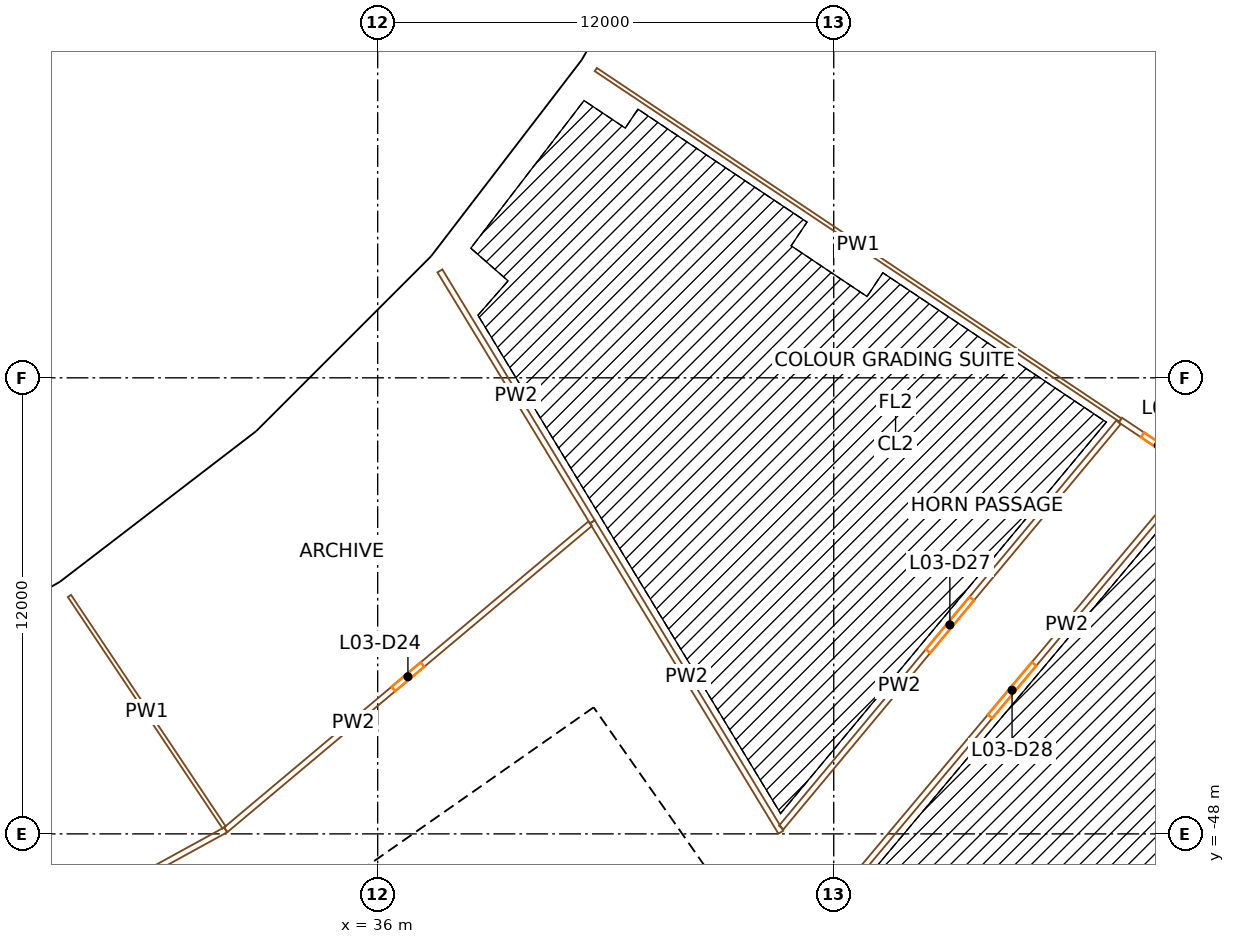
"""IFC4 building model, lengths in metres.
Left out: names, types, materials, properties, quantities, classifications, styles, units other than length and angle.
Written with IfcOpenShell. Run it as: python <this file> out.ifc"""

import sys

from ifc_helpers import new_model, si_unit, direction, frame, frame_2d, origin, origin_2d, place, context, subcontext, project, spatial, rectangle, extrude, element, fill, save


model = new_model("IFC4")
c1 = context("Model", 3, precision=1e-05, world=origin(), true_north=direction((0.0, 1.0)))
c2 = subcontext(c1, "Body", "Model", "MODEL_VIEW")
j1 = project(units=[si_unit("LENGTHUNIT", "METRE"), si_unit("PLANEANGLEUNIT", "RADIAN")], contexts=[c1])
p1 = place(None, origin())
s1 = spatial("IfcSite", under=j1, at=p1, CompositionType="ELEMENT")
p2 = place(p1, origin())
s2 = spatial("IfcBuilding", under=s1, at=p2, CompositionType="ELEMENT")
p3 = place(p2, frame((0.0, 0.0, 27.0)))
s3 = spatial("IfcBuildingStorey", under=s2, at=p3, CompositionType="ELEMENT", Elevation=27.0)
p4 = place(p3, frame((28.195, -42.197, 0.0), z_axis=(0.0, 0.0, 1.0), x_axis=(0.831469612303, 0.55557023302, 0.0)))
e1 = element("IfcColumn", 1, at=p4, inside=s3, PredefinedType="COLUMN", context=c2, shape_type="SweptSolid", body=[
    extrude(rectangle(XDim=1.1, YDim=1.3, at=origin_2d()), origin(), (0.0, 0.0, 1.0), 4.5),
])
p5 = place(p3, frame((32.362, -48.433, 0.0), z_axis=(0.0, 0.0, 1.0), x_axis=(0.831469612303, 0.55557023302, 0.0)))
e2 = element("IfcColumn", 2, at=p5, inside=s3, PredefinedType="COLUMN", context=c2, shape_type="SweptSolid", body=[
    extrude(rectangle(XDim=1.4, YDim=1.8, at=origin_2d()), origin(), (0.0, 0.0, 1.0), 4.5),
])
p6 = place(p3, frame((33.462, -38.156, 0.0), z_axis=(0.0, 0.0, 1.0), x_axis=(0.751839807479, 0.6593458151, 0.0)))
e3 = element("IfcColumn", 3, at=p6, inside=s3, PredefinedType="COLUMN", context=c2, shape_type="SweptSolid", body=[
    extrude(rectangle(XDim=1.1, YDim=1.3, at=origin_2d()), origin(), (0.0, 0.0, 1.0), 4.5),
])
p7 = place(p3, frame((38.407, -43.795, 0.0), z_axis=(0.0, 0.0, 1.0), x_axis=(0.751839807479, 0.6593458151, 0.0)))
e4 = element("IfcColumn", 4, at=p7, inside=s3, PredefinedType="COLUMN", context=c2, shape_type="SweptSolid", body=[
    extrude(rectangle(XDim=1.4, YDim=1.8, at=origin_2d()), origin(), (0.0, 0.0, 1.0), 4.5),
])
p8 = place(p3, frame((38.156, -33.462, 0.0), z_axis=(0.0, 0.0, 1.0), x_axis=(0.6593458151, 0.751839807479, 0.0)))
e5 = element("IfcColumn", 5, at=p8, inside=s3, PredefinedType="COLUMN", context=c2, shape_type="SweptSolid", body=[
    extrude(rectangle(XDim=1.1, YDim=1.3, at=origin_2d()), origin(), (0.0, 0.0, 1.0), 4.5),
])
p9 = place(p3, frame((43.795, -38.407, 0.0), z_axis=(0.0, 0.0, 1.0), x_axis=(0.6593458151, 0.751839807479, 0.0)))
e6 = element("IfcColumn", 6, at=p9, inside=s3, PredefinedType="COLUMN", context=c2, shape_type="SweptSolid", body=[
    extrude(rectangle(XDim=1.4, YDim=1.8, at=origin_2d()), origin(), (0.0, 0.0, 1.0), 4.5),
])
p10 = place(p3, frame((42.197, -28.195, 0.0), z_axis=(0.0, 0.0, 1.0), x_axis=(0.55557023302, 0.831469612303, 0.0)))
e7 = element("IfcColumn", 7, at=p10, inside=s3, PredefinedType="COLUMN", context=c2, shape_type="SweptSolid", body=[
    extrude(rectangle(XDim=1.1, YDim=1.3, at=origin_2d()), origin(), (0.0, 0.0, 1.0), 4.5),
])
p11 = place(p3, frame((48.433, -32.362, 0.0), z_axis=(0.0, 0.0, 1.0), x_axis=(0.55557023302, 0.831469612303, 0.0)))
e8 = element("IfcColumn", 8, at=p11, inside=s3, PredefinedType="COLUMN", context=c2, shape_type="SweptSolid", body=[
    extrude(rectangle(XDim=1.4, YDim=1.8, at=origin_2d()), origin(), (0.0, 0.0, 1.0), 4.5),
])
p12 = place(p3, frame((49.779, -57.191, 0.0), z_axis=(0.0, 0.0, 1.0), x_axis=(-0.573577477574, 0.819151315216, 0.0)))
e9 = element("IfcWall", 9, at=p12, inside=s3, PredefinedType="SHEAR", context=c2, shape_type="SweptSolid", body=[
    extrude(rectangle(XDim=14.8, YDim=0.9, at=frame_2d((7.4, 0.0))), origin(), (0.0, 0.0, 1.0), 4.1),
])
p13 = place(p12, frame((6.7, 0.0, 0.0)))
e10 = element("IfcOpeningElement", 10, at=p13, cuts=e9, PredefinedType="OPENING", context=c2, shape_type="SweptSolid", body=[
    extrude(rectangle(XDim=1.4, YDim=2.1, at=frame_2d((0.7, 1.05))), frame((0.0, 0.46, 0.0), z_axis=(0.0, -1.0, 0.0), x_axis=(1.0, 0.0, 0.0)), (0.0, 0.0, 1.0), 0.92),
])
p14 = place(p3, frame((28.854, -54.324, 0.0), z_axis=(0.0, 0.0, 1.0), x_axis=(0.819145767589, 0.573585400304, 0.0)))
e11 = element("IfcWall", 11, at=p14, inside=s3, PredefinedType="SHEAR", context=c2, shape_type="SweptSolid", body=[
    extrude(rectangle(XDim=15.045, YDim=0.9, at=frame_2d((7.523, 0.0))), origin(), (0.0, 0.0, 1.0), 4.1),
])
p15 = place(p14, frame((0.6, 0.0, 0.0)))
e12 = element("IfcOpeningElement", 12, at=p15, cuts=e11, PredefinedType="OPENING", context=c2, shape_type="SweptSolid", body=[
    extrude(rectangle(XDim=1.0, YDim=2.1, at=frame_2d((0.5, 1.05))), frame((0.0, 0.46, 0.0), z_axis=(0.0, -1.0, 0.0), x_axis=(1.0, 0.0, 0.0)), (0.0, 0.0, 1.0), 0.92),
])
p16 = place(p14, frame((3.275, 0.0, 0.0)))
e13 = element("IfcOpeningElement", 13, at=p16, cuts=e11, PredefinedType="OPENING", context=c2, shape_type="SweptSolid", body=[
    extrude(rectangle(XDim=1.0, YDim=2.1, at=frame_2d((0.5, 1.05))), frame((0.0, 0.46, 0.0), z_axis=(0.0, -1.0, 0.0), x_axis=(1.0, 0.0, 0.0)), (0.0, 0.0, 1.0), 0.92),
])
p17 = place(p14, frame((6.225, 0.0, 0.0)))
e14 = element("IfcOpeningElement", 14, at=p17, cuts=e11, PredefinedType="OPENING", context=c2, shape_type="SweptSolid", body=[
    extrude(rectangle(XDim=0.9, YDim=2.1, at=frame_2d((0.45, 1.05))), frame((0.0, 0.46, 0.0), z_axis=(0.0, -1.0, 0.0), x_axis=(1.0, 0.0, 0.0)), (0.0, 0.0, 1.0), 0.92),
])
p18 = place(p14, frame((13.495, 0.0, 0.0)))
e15 = element("IfcOpeningElement", 15, at=p18, cuts=e11, PredefinedType="OPENING", context=c2, shape_type="SweptSolid", body=[
    extrude(rectangle(XDim=1.1, YDim=2.1, at=frame_2d((0.55, 1.05))), frame((0.0, 0.46, 0.0), z_axis=(0.0, -1.0, 0.0), x_axis=(1.0, 0.0, 0.0)), (0.0, 0.0, 1.0), 0.92),
])
p19 = place(p3, frame((27.714, -41.583, 0.0), z_axis=(0.0, 0.0, 1.0), x_axis=(-0.866022817921, -0.50000447882, 0.0)))
e16 = element("IfcWall", 16, at=p19, inside=s3, PredefinedType="SOLIDWALL", context=c2, shape_type="SweptSolid", body=[
    extrude(rectangle(XDim=6.419, YDim=0.45, at=frame_2d((3.21, 0.0))), origin(), (0.0, 0.0, 1.0), 3.2),
])
p20 = place(p19, frame((3.66, 0.0, 0.9)))
e17 = element("IfcOpeningElement", 17, at=p20, cuts=e16, PredefinedType="OPENING", context=c2, shape_type="SweptSolid", body=[
    extrude(rectangle(XDim=1.2, YDim=2.15, at=frame_2d((0.6, 1.075))), frame((0.0, 0.235, 0.0), z_axis=(0.0, -1.0, 0.0), x_axis=(1.0, 0.0, 0.0)), (0.0, 0.0, 1.0), 0.47),
])
p21 = place(p19, frame((1.56, 0.0, 0.9)))
e18 = element("IfcOpeningElement", 18, at=p21, cuts=e16, PredefinedType="OPENING", context=c2, shape_type="SweptSolid", body=[
    extrude(rectangle(XDim=1.2, YDim=2.15, at=frame_2d((0.6, 1.075))), frame((0.0, 0.235, 0.0), z_axis=(0.0, -1.0, 0.0), x_axis=(1.0, 0.0, 0.0)), (0.0, 0.0, 1.0), 0.47),
])
p22 = place(p3, frame((32.975, -37.555, 0.0), z_axis=(0.0, 0.0, 1.0), x_axis=(-0.793338838284, -0.608780327927, 0.0)))
e19 = element("IfcWall", 19, at=p22, inside=s3, PredefinedType="SOLIDWALL", context=c2, shape_type="SweptSolid", body=[
    extrude(rectangle(XDim=6.597, YDim=0.45, at=frame_2d((3.298, 0.0))), origin(), (0.0, 0.0, 1.0), 3.2),
])
p23 = place(p22, frame((3.749, 0.0, 0.9)))
e20 = element("IfcOpeningElement", 20, at=p23, cuts=e19, PredefinedType="OPENING", context=c2, shape_type="SweptSolid", body=[
    extrude(rectangle(XDim=1.2, YDim=2.15, at=frame_2d((0.6, 1.075))), frame((0.0, 0.235, 0.0), z_axis=(0.0, -1.0, 0.0), x_axis=(1.0, 0.0, 0.0)), (0.0, 0.0, 1.0), 0.47),
])
p24 = place(p22, frame((1.648, 0.0, 0.9)))
e21 = element("IfcOpeningElement", 21, at=p24, cuts=e19, PredefinedType="OPENING", context=c2, shape_type="SweptSolid", body=[
    extrude(rectangle(XDim=1.2, YDim=2.15, at=frame_2d((0.6, 1.075))), frame((0.0, 0.235, 0.0), z_axis=(0.0, -1.0, 0.0), x_axis=(1.0, 0.0, 0.0)), (0.0, 0.0, 1.0), 0.47),
])
p25 = place(p3, frame((37.532, -32.993, 0.0), z_axis=(0.0, 0.0, 1.0), x_axis=(-0.707106781187, -0.707106781187, 0.0)))
e22 = element("IfcWall", 22, at=p25, inside=s3, PredefinedType="SOLIDWALL", context=c2, shape_type="SweptSolid", body=[
    extrude(rectangle(XDim=6.419, YDim=0.45, at=frame_2d((3.209, 0.0))), origin(), (0.0, 0.0, 1.0), 3.2),
])
p26 = place(p25, frame((3.66, 0.0, 0.9)))
e23 = element("IfcOpeningElement", 23, at=p26, cuts=e22, PredefinedType="OPENING", context=c2, shape_type="SweptSolid", body=[
    extrude(rectangle(XDim=1.2, YDim=2.15, at=frame_2d((0.6, 1.075))), frame((0.0, 0.235, 0.0), z_axis=(0.0, -1.0, 0.0), x_axis=(1.0, 0.0, 0.0)), (0.0, 0.0, 1.0), 0.47),
])
p27 = place(p25, frame((1.56, 0.0, 0.9)))
e24 = element("IfcOpeningElement", 24, at=p27, cuts=e22, PredefinedType="OPENING", context=c2, shape_type="SweptSolid", body=[
    extrude(rectangle(XDim=1.2, YDim=2.15, at=frame_2d((0.6, 1.075))), frame((0.0, 0.235, 0.0), z_axis=(0.0, -1.0, 0.0), x_axis=(1.0, 0.0, 0.0)), (0.0, 0.0, 1.0), 0.47),
])
p28 = place(p3, frame((41.571, -27.741, 0.0), z_axis=(0.0, 0.0, 1.0), x_axis=(-0.608780327927, -0.793338838284, 0.0)))
e25 = element("IfcWall", 25, at=p28, inside=s3, PredefinedType="SOLIDWALL", context=c2, shape_type="SweptSolid", body=[
    extrude(rectangle(XDim=6.597, YDim=0.45, at=frame_2d((3.298, 0.0))), origin(), (0.0, 0.0, 1.0), 3.2),
])
p29 = place(p28, frame((3.749, 0.0, 0.9)))
e26 = element("IfcOpeningElement", 26, at=p29, cuts=e25, PredefinedType="OPENING", context=c2, shape_type="SweptSolid", body=[
    extrude(rectangle(XDim=1.2, YDim=2.15, at=frame_2d((0.6, 1.075))), frame((0.0, 0.235, 0.0), z_axis=(0.0, -1.0, 0.0), x_axis=(1.0, 0.0, 0.0)), (0.0, 0.0, 1.0), 0.47),
])
p30 = place(p28, frame((1.648, 0.0, 0.9)))
e27 = element("IfcOpeningElement", 27, at=p30, cuts=e25, PredefinedType="OPENING", context=c2, shape_type="SweptSolid", body=[
    extrude(rectangle(XDim=1.2, YDim=2.15, at=frame_2d((0.6, 1.075))), frame((0.0, 0.235, 0.0), z_axis=(0.0, -1.0, 0.0), x_axis=(1.0, 0.0, 0.0)), (0.0, 0.0, 1.0), 0.47),
])
p31 = place(p3, frame((44.792, -22.155, 0.0), z_axis=(0.0, 0.0, 1.0), x_axis=(-0.50000447882, -0.866022817921, 0.0)))
e28 = element("IfcWall", 28, at=p31, inside=s3, PredefinedType="SOLIDWALL", context=c2, shape_type="SweptSolid", body=[
    extrude(rectangle(XDim=6.419, YDim=0.45, at=frame_2d((3.21, 0.0))), origin(), (0.0, 0.0, 1.0), 3.2),
])
p32 = place(p31, frame((3.66, 0.0, 0.9)))
e29 = element("IfcOpeningElement", 29, at=p32, cuts=e28, PredefinedType="OPENING", context=c2, shape_type="SweptSolid", body=[
    extrude(rectangle(XDim=1.2, YDim=2.15, at=frame_2d((0.6, 1.075))), frame((0.0, 0.235, 0.0), z_axis=(0.0, -1.0, 0.0), x_axis=(1.0, 0.0, 0.0)), (0.0, 0.0, 1.0), 0.47),
])
p33 = place(p31, frame((1.56, 0.0, 0.9)))
e30 = element("IfcOpeningElement", 30, at=p33, cuts=e28, PredefinedType="OPENING", context=c2, shape_type="SweptSolid", body=[
    extrude(rectangle(XDim=1.2, YDim=2.15, at=frame_2d((0.6, 1.075))), frame((0.0, 0.235, 0.0), z_axis=(0.0, -1.0, 0.0), x_axis=(1.0, 0.0, 0.0)), (0.0, 0.0, 1.0), 0.47),
])
p34 = place(p3, frame((23.24, -52.697, 0.0), z_axis=(0.0, 0.0, 1.0), x_axis=(0.876826033283, 0.480807765492, 0.0)))
e31 = element("IfcWall", 31, at=p34, inside=s3, PredefinedType="PARTITIONING", context=c2, shape_type="SweptSolid", body=[
    extrude(rectangle(XDim=9.991, YDim=0.15, at=frame_2d((4.996, 0.0))), origin(), (0.0, 0.0, 1.0), 3.1),
])
p35 = place(p34, frame((4.496, 0.0, 0.0)))
e32 = element("IfcOpeningElement", 32, at=p35, cuts=e31, PredefinedType="OPENING", context=c2, shape_type="SweptSolid", body=[
    extrude(rectangle(XDim=1.0, YDim=2.1, at=frame_2d((0.5, 1.05))), frame((0.0, 0.085, 0.0), z_axis=(0.0, -1.0, 0.0), x_axis=(1.0, 0.0, 0.0)), (0.0, 0.0, 1.0), 0.17),
])
p36 = place(p3, frame((27.89, -41.74, 0.0), z_axis=(0.0, 0.0, 1.0), x_axis=(0.555569023768, -0.831470420297, 0.0)))
e33 = element("IfcWall", 33, at=p36, inside=s3, PredefinedType="PARTITIONING", context=c2, shape_type="SweptSolid", body=[
    extrude(rectangle(XDim=7.325, YDim=0.1, at=frame_2d((3.663, 0.0))), origin(), (0.0, 0.0, 1.0), 3.1),
])
p37 = place(p3, frame((32.001, -47.893, 0.0), z_axis=(0.0, 0.0, 1.0), x_axis=(0.765734049768, 0.643157340801, 0.0)))
e34 = element("IfcWall", 34, at=p37, inside=s3, PredefinedType="PARTITIONING", context=c2, shape_type="SweptSolid", body=[
    extrude(rectangle(XDim=12.524, YDim=0.15, at=frame_2d((6.262, 0.0))), origin(), (0.0, 0.0, 1.0), 3.1),
])
p38 = place(p37, frame((5.762, 0.0, 0.0)))
e35 = element("IfcOpeningElement", 35, at=p38, cuts=e34, PredefinedType="OPENING", context=c2, shape_type="SweptSolid", body=[
    extrude(rectangle(XDim=1.0, YDim=2.1, at=frame_2d((0.5, 1.05))), frame((0.0, 0.085, 0.0), z_axis=(0.0, -1.0, 0.0), x_axis=(1.0, 0.0, 0.0)), (0.0, 0.0, 1.0), 0.17),
])
p39 = place(p3, frame((37.638, -33.187, 0.0), z_axis=(0.0, 0.0, 1.0), x_axis=(0.519163683086, -0.854674833, 0.0)))
e36 = element("IfcWall", 36, at=p39, inside=s3, PredefinedType="PARTITIONING", context=c2, shape_type="SweptSolid", body=[
    extrude(rectangle(XDim=7.725, YDim=0.15, at=frame_2d((3.862, 0.0))), origin(), (0.0, 0.0, 1.0), 3.1),
])
p40 = place(p3, frame((41.648, -39.789, 0.0), z_axis=(0.0, 0.0, 1.0), x_axis=(0.519144162426, -0.854686690325, 0.0)))
e37 = element("IfcWall", 37, at=p40, inside=s3, PredefinedType="PARTITIONING", context=c2, shape_type="SweptSolid", body=[
    extrude(rectangle(XDim=9.554, YDim=0.15, at=frame_2d((4.777, 0.0))), origin(), (0.0, 0.0, 1.0), 3.1),
])
p41 = place(p3, frame((46.617, -47.833, 0.0), z_axis=(0.0, 0.0, 1.0), x_axis=(0.639786242962, 0.768552902093, 0.0)))
e38 = element("IfcWall", 38, at=p41, inside=s3, PredefinedType="PARTITIONING", context=c2, shape_type="SweptSolid", body=[
    extrude(rectangle(XDim=13.875, YDim=0.15, at=frame_2d((6.938, 0.0))), origin(), (0.0, 0.0, 1.0), 3.1),
])
p42 = place(p41, frame((6.037, 0.0, 0.0)))
e39 = element("IfcOpeningElement", 39, at=p42, cuts=e38, PredefinedType="OPENING", context=c2, shape_type="SweptSolid", body=[
    extrude(rectangle(XDim=1.8, YDim=2.1, at=frame_2d((0.9, 1.05))), frame((0.0, 0.085, 0.0), z_axis=(0.0, -1.0, 0.0), x_axis=(1.0, 0.0, 0.0)), (0.0, 0.0, 1.0), 0.17),
])
p43 = place(p3, frame((57.49, -38.503, 0.0), z_axis=(0.0, 0.0, 1.0), x_axis=(-0.642835259292, -0.766004457828, 0.0)))
e40 = element("IfcWall", 40, at=p43, inside=s3, PredefinedType="PARTITIONING", context=c2, shape_type="SweptSolid", body=[
    extrude(rectangle(XDim=14.926, YDim=0.15, at=frame_2d((7.463, 0.0))), origin(), (0.0, 0.0, 1.0), 3.1),
])
p44 = place(p43, frame((6.563, 0.0, 0.0)))
e41 = element("IfcOpeningElement", 41, at=p44, cuts=e40, PredefinedType="OPENING", context=c2, shape_type="SweptSolid", body=[
    extrude(rectangle(XDim=1.8, YDim=2.1, at=frame_2d((0.9, 1.05))), frame((0.0, 0.085, 0.0), z_axis=(0.0, -1.0, 0.0), x_axis=(1.0, 0.0, 0.0)), (0.0, 0.0, 1.0), 0.17),
])
p45 = place(p3, frame((55.542, -37.112, 0.0), z_axis=(0.0, 0.0, 1.0), x_axis=(-0.831472868546, 0.555565359677, 0.0)))
e42 = element("IfcWall", 42, at=p45, inside=s3, PredefinedType="PARTITIONING", context=c2, shape_type="SweptSolid", body=[
    extrude(rectangle(XDim=16.6, YDim=0.1, at=frame_2d((8.3, 0.0))), origin(), (0.0, 0.0, 1.0), 3.1),
])
p46 = place(p3, frame((55.542, -37.112, 0.0), z_axis=(0.0, 0.0, 1.0), x_axis=(0.831423745392, -0.555638871569, 0.0)))
e43 = element("IfcWall", 43, at=p46, inside=s3, PredefinedType="PARTITIONING", context=c2, shape_type="SweptSolid", body=[
    extrude(rectangle(XDim=2.4, YDim=0.15, at=frame_2d((1.2, 0.0))), origin(), (0.0, 0.0, 1.0), 3.1),
])
p47 = place(p46, frame((0.7, 0.0, 0.0)))
e44 = element("IfcOpeningElement", 44, at=p47, cuts=e43, PredefinedType="OPENING", context=c2, shape_type="SweptSolid", body=[
    extrude(rectangle(XDim=1.0, YDim=2.1, at=frame_2d((0.5, 1.05))), frame((0.0, 0.085, 0.0), z_axis=(0.0, -1.0, 0.0), x_axis=(1.0, 0.0, 0.0)), (0.0, 0.0, 1.0), 0.17),
])
p48 = place(p18, origin())
e45 = element("IfcDoor", 45, at=p48, inside=s3, OperationType="SINGLE_SWING_RIGHT", PredefinedType="DOOR", context=c2, shape_type="SweptSolid", body=[
    extrude(rectangle(XDim=1.1, YDim=2.1, at=frame_2d((0.55, 1.05))), frame((0.0, 0.025, 0.0), z_axis=(0.0, -1.0, 0.0), x_axis=(1.0, 0.0, 0.0)), (0.0, 0.0, 1.0), 0.05),
])
fill(e15, e45)
p49 = place(p23, origin())
e46 = element("IfcWindow", 46, at=p49, inside=s3, PartitioningType="SINGLE_PANEL", PredefinedType="WINDOW", context=c2, shape_type="SweptSolid", body=[
    extrude(rectangle(XDim=1.2, YDim=2.15, at=frame_2d((0.6, 1.075))), frame((0.0, 0.03, 0.0), z_axis=(0.0, -1.0, 0.0), x_axis=(1.0, 0.0, 0.0)), (0.0, 0.0, 1.0), 0.06),
])
fill(e20, e46)
p50 = place(p24, origin())
e47 = element("IfcWindow", 47, at=p50, inside=s3, PartitioningType="SINGLE_PANEL", PredefinedType="WINDOW", context=c2, shape_type="SweptSolid", body=[
    extrude(rectangle(XDim=1.2, YDim=2.15, at=frame_2d((0.6, 1.075))), frame((0.0, 0.03, 0.0), z_axis=(0.0, -1.0, 0.0), x_axis=(1.0, 0.0, 0.0)), (0.0, 0.0, 1.0), 0.06),
])
fill(e21, e47)
p51 = place(p26, origin())
e48 = element("IfcWindow", 48, at=p51, inside=s3, PartitioningType="SINGLE_PANEL", PredefinedType="WINDOW", context=c2, shape_type="SweptSolid", body=[
    extrude(rectangle(XDim=1.2, YDim=2.15, at=frame_2d((0.6, 1.075))), frame((0.0, 0.03, 0.0), z_axis=(0.0, -1.0, 0.0), x_axis=(1.0, 0.0, 0.0)), (0.0, 0.0, 1.0), 0.06),
])
fill(e23, e48)
p52 = place(p27, origin())
e49 = element("IfcWindow", 49, at=p52, inside=s3, PartitioningType="SINGLE_PANEL", PredefinedType="WINDOW", context=c2, shape_type="SweptSolid", body=[
    extrude(rectangle(XDim=1.2, YDim=2.15, at=frame_2d((0.6, 1.075))), frame((0.0, 0.03, 0.0), z_axis=(0.0, -1.0, 0.0), x_axis=(1.0, 0.0, 0.0)), (0.0, 0.0, 1.0), 0.06),
])
fill(e24, e49)
p53 = place(p29, origin())
e50 = element("IfcWindow", 50, at=p53, inside=s3, PartitioningType="SINGLE_PANEL", PredefinedType="WINDOW", context=c2, shape_type="SweptSolid", body=[
    extrude(rectangle(XDim=1.2, YDim=2.15, at=frame_2d((0.6, 1.075))), frame((0.0, 0.03, 0.0), z_axis=(0.0, -1.0, 0.0), x_axis=(1.0, 0.0, 0.0)), (0.0, 0.0, 1.0), 0.06),
])
fill(e26, e50)
p54 = place(p30, origin())
e51 = element("IfcWindow", 51, at=p54, inside=s3, PartitioningType="SINGLE_PANEL", PredefinedType="WINDOW", context=c2, shape_type="SweptSolid", body=[
    extrude(rectangle(XDim=1.2, YDim=2.15, at=frame_2d((0.6, 1.075))), frame((0.0, 0.03, 0.0), z_axis=(0.0, -1.0, 0.0), x_axis=(1.0, 0.0, 0.0)), (0.0, 0.0, 1.0), 0.06),
])
fill(e27, e51)
p55 = place(p38, origin())
e52 = element("IfcDoor", 52, at=p55, inside=s3, OperationType="SINGLE_SWING_RIGHT", PredefinedType="DOOR", context=c2, shape_type="SweptSolid", body=[
    extrude(rectangle(XDim=1.0, YDim=2.1, at=frame_2d((0.5, 1.05))), frame((0.0, 0.025, 0.0), z_axis=(0.0, -1.0, 0.0), x_axis=(1.0, 0.0, 0.0)), (0.0, 0.0, 1.0), 0.05),
])
fill(e35, e52)
p56 = place(p42, origin())
e53 = element("IfcDoor", 53, at=p56, inside=s3, OperationType="DOUBLE_DOOR_SINGLE_SWING", PredefinedType="DOOR", context=c2, shape_type="SweptSolid", body=[
    extrude(rectangle(XDim=1.8, YDim=2.1, at=frame_2d((0.9, 1.05))), frame((0.0, 0.025, 0.0), z_axis=(0.0, -1.0, 0.0), x_axis=(1.0, 0.0, 0.0)), (0.0, 0.0, 1.0), 0.05),
])
fill(e39, e53)
p57 = place(p44, origin())
e54 = element("IfcDoor", 54, at=p57, inside=s3, OperationType="DOUBLE_DOOR_SINGLE_SWING", PredefinedType="DOOR", context=c2, shape_type="SweptSolid", body=[
    extrude(rectangle(XDim=1.8, YDim=2.1, at=frame_2d((0.9, 1.05))), frame((0.0, 0.025, 0.0), z_axis=(0.0, -1.0, 0.0), x_axis=(1.0, 0.0, 0.0)), (0.0, 0.0, 1.0), 0.05),
])
fill(e41, e54)
p58 = place(p47, origin())
e55 = element("IfcDoor", 55, at=p58, inside=s3, OperationType="SINGLE_SWING_RIGHT", PredefinedType="DOOR", context=c2, shape_type="SweptSolid", body=[
    extrude(rectangle(XDim=1.0, YDim=2.1, at=frame_2d((0.5, 1.05))), frame((0.0, 0.025, 0.0), z_axis=(0.0, -1.0, 0.0), x_axis=(1.0, 0.0, 0.0)), (0.0, 0.0, 1.0), 0.05),
])
fill(e44, e55)
save(model, sys.argv[1])
